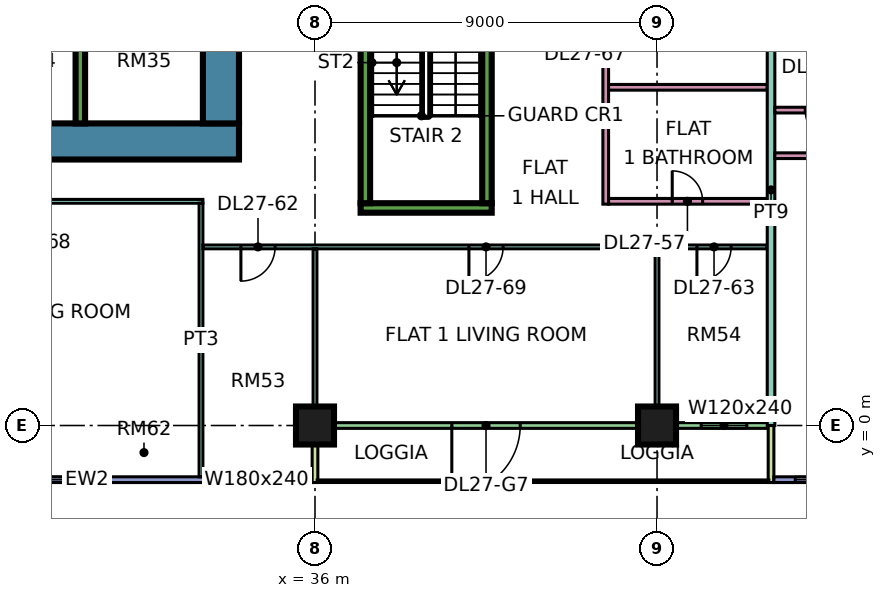
"""IFC4 building model, lengths in metres.
Left out: names, types, materials, properties, quantities, classifications, styles, units other than length and angle.
Written with IfcOpenShell. Run it as: python <this file> out.ifc"""

import sys

from ifc_helpers import new_model, si_unit, direction, frame, frame_2d, origin, origin_2d, place, context, subcontext, project, spatial, rectangle, extrude, element, fill, save


model = new_model("IFC4")
c1 = context("Model", 3, precision=1e-05, world=origin(), true_north=direction((0.0, 1.0)))
c2 = subcontext(c1, "Body", "Model", "MODEL_VIEW")
j1 = project(units=[si_unit("LENGTHUNIT", "METRE"), si_unit("PLANEANGLEUNIT", "RADIAN")], contexts=[c1])
p1 = place(None, origin())
s1 = spatial("IfcSite", under=j1, at=p1, CompositionType="ELEMENT")
p2 = place(p1, origin())
s2 = spatial("IfcBuilding", under=s1, at=p2, CompositionType="ELEMENT")
p3 = place(p2, frame((0.0, 0.0, 118.15)))
s3 = spatial("IfcBuildingStorey", under=s2, at=p3, CompositionType="ELEMENT", Elevation=118.15)
for number, where, z_axis, x_axis in (
    (1, (36.0, 0.0, 0.0), (0.0, 0.0, 1.0), (1.0, 0.0, 0.0)),
    (2, (45.0, 0.0, 0.0), (0.0, 0.0, 1.0), (1.0, 0.0, 0.0)),
):
    element("IfcColumn", number, at=place(p3, frame(where, z_axis=z_axis, x_axis=x_axis)), inside=s3, PredefinedType="COLUMN", context=c2, shape_type="SweptSolid", body=[
        extrude(rectangle(XDim=1.0, YDim=1.0, at=origin_2d()), origin(), (0.0, 0.0, 1.0), 3.75),
    ])
p4 = place(p3, frame((9.0, 7.475, 0.0), z_axis=(0.0, 0.0, 1.0), x_axis=(1.0, 0.0, 0.0)))
e3 = element("IfcWall", 3, at=p4, inside=s3, PredefinedType="SHEAR", context=c2, shape_type="SweptSolid", body=[
    extrude(rectangle(XDim=25.0, YDim=0.95, at=frame_2d((12.5, 0.0))), origin(), (0.0, 0.0, 1.0), 3.75),
])
p5 = place(p3, frame((33.525, 7.95, 0.0), z_axis=(0.0, 0.0, 1.0), x_axis=(0.0, 1.0, 0.0)))
e4 = element("IfcWall", 4, at=p5, inside=s3, PredefinedType="SHEAR", context=c2, shape_type="SweptSolid", body=[
    extrude(rectangle(XDim=11.1, YDim=0.95, at=frame_2d((5.55, 0.0))), origin(), (0.0, 0.0, 1.0), 3.75),
])
p6 = place(p5, frame((5.25, 0.0, 0.0)))
e5 = element("IfcOpeningElement", 5, at=p6, cuts=e4, PredefinedType="OPENING", context=c2, shape_type="SweptSolid", body=[
    extrude(rectangle(XDim=1.8, YDim=2.4, at=frame_2d((0.9, 1.2))), frame((0.0, 0.485, 0.0), z_axis=(0.0, -1.0, 0.0), x_axis=(1.0, 0.0, 0.0)), (0.0, 0.0, 1.0), 0.97),
])
p7 = place(p3, frame((29.825, 7.95, 0.0), z_axis=(0.0, 0.0, 1.0), x_axis=(0.0, 1.0, 0.0)))
e6 = element("IfcWall", 6, at=p7, inside=s3, PredefinedType="SHEAR", context=c2, shape_type="SweptSolid", body=[
    extrude(rectangle(XDim=3.25, YDim=0.25, at=frame_2d((1.625, 0.0))), origin(), (0.0, 0.0, 1.0), 3.75),
])
p8 = place(p3, frame((37.2, 5.725, 0.0), z_axis=(0.0, 0.0, 1.0), x_axis=(1.0, 0.0, 0.0)))
e7 = element("IfcWall", 7, at=p8, inside=s3, PredefinedType="SHEAR", context=c2, shape_type="SweptSolid", body=[
    extrude(rectangle(XDim=3.45, YDim=0.25, at=frame_2d((1.725, 0.0))), origin(), (0.0, 0.0, 1.0), 3.75),
])
for number, where, z_axis, x_axis in (
    (8, (37.325, 5.85, 0.0), (0.0, 0.0, 1.0), (0.0, 1.0, 0.0)),
    (9, (40.525, 5.85, 0.0), (0.0, 0.0, 1.0), (0.0, 1.0, 0.0)),
):
    element("IfcWall", number, at=place(p3, frame(where, z_axis=z_axis, x_axis=x_axis)), inside=s3, PredefinedType="SHEAR", context=c2, shape_type="SweptSolid", body=[
        extrude(rectangle(XDim=6.5, YDim=0.25, at=frame_2d((3.25, 0.0))), origin(), (0.0, 0.0, 1.0), 3.75),
    ])
p9 = place(p3, frame((24.075, -1.425, 0.0), z_axis=(0.0, 0.0, 1.0), x_axis=(1.0, 0.0, 0.0)))
e10 = element("IfcWall", 10, at=p9, inside=s3, PredefinedType="SOLIDWALL", context=c2, shape_type="SweptSolid", body=[
    extrude(rectangle(XDim=11.85, YDim=0.15, at=frame_2d((5.925, 0.0))), origin(), (0.0, 0.0, 1.0), 3.35),
])
p10 = place(p9, frame((2.962, 0.0, 0.45)))
e11 = element("IfcOpeningElement", 11, at=p10, cuts=e10, PredefinedType="OPENING", context=c2, shape_type="SweptSolid", body=[
    extrude(rectangle(XDim=3.0, YDim=2.4, at=frame_2d((1.5, 1.2))), frame((0.0, 0.085, 0.0), z_axis=(0.0, -1.0, 0.0), x_axis=(1.0, 0.0, 0.0)), (0.0, 0.0, 1.0), 0.17),
])
p11 = place(p9, frame((9.488, 0.0, 0.45)))
e12 = element("IfcOpeningElement", 12, at=p11, cuts=e10, PredefinedType="OPENING", context=c2, shape_type="SweptSolid", body=[
    extrude(rectangle(XDim=1.8, YDim=2.4, at=frame_2d((0.9, 1.2))), frame((0.0, 0.085, 0.0), z_axis=(0.0, -1.0, 0.0), x_axis=(1.0, 0.0, 0.0)), (0.0, 0.0, 1.0), 0.17),
])
p12 = place(p3, frame((36.075, 0.0, 0.0), z_axis=(0.0, 0.0, 1.0), x_axis=(1.0, 0.0, 0.0)))
e13 = element("IfcWall", 13, at=p12, inside=s3, PredefinedType="SOLIDWALL", context=c2, shape_type="SweptSolid", body=[
    extrude(rectangle(XDim=11.85, YDim=0.15, at=frame_2d((5.925, 0.0))), origin(), (0.0, 0.0, 1.0), 3.35),
])
p13 = place(p12, frame((3.525, 0.0, 0.0)))
e14 = element("IfcOpeningElement", 14, at=p13, cuts=e13, PredefinedType="OPENING", context=c2, shape_type="SweptSolid", body=[
    extrude(rectangle(XDim=1.8, YDim=2.4, at=frame_2d((0.9, 1.2))), frame((0.0, 0.085, 0.0), z_axis=(0.0, -1.0, 0.0), x_axis=(1.0, 0.0, 0.0)), (0.0, 0.0, 1.0), 0.17),
])
p14 = place(p12, frame((10.087, 0.0, 0.45)))
e15 = element("IfcOpeningElement", 15, at=p14, cuts=e13, PredefinedType="OPENING", context=c2, shape_type="SweptSolid", body=[
    extrude(rectangle(XDim=1.2, YDim=2.4, at=frame_2d((0.6, 1.2))), frame((0.0, 0.085, 0.0), z_axis=(0.0, -1.0, 0.0), x_axis=(1.0, 0.0, 0.0)), (0.0, 0.0, 1.0), 0.17),
])
for number, where, z_axis, x_axis in (
    (16, (36.0, -1.5, 0.0), (0.0, 0.0, 1.0), (0.0, 1.0, 0.0)),
    (17, (48.0, -1.5, 0.0), (0.0, 0.0, 1.0), (0.0, 1.0, 0.0)),
):
    element("IfcWall", number, at=place(p3, frame(where, z_axis=z_axis, x_axis=x_axis)), inside=s3, PredefinedType="SOLIDWALL", context=c2, shape_type="SweptSolid", body=[
        extrude(rectangle(XDim=1.5, YDim=0.15, at=frame_2d((0.75, 0.0))), origin(), (0.0, 0.0, 1.0), 3.35),
    ])
p15 = place(p3, frame((48.075, -1.425, 0.0), z_axis=(0.0, 0.0, 1.0), x_axis=(1.0, 0.0, 0.0)))
e18 = element("IfcWall", 18, at=p15, inside=s3, PredefinedType="SOLIDWALL", context=c2, shape_type="SweptSolid", body=[
    extrude(rectangle(XDim=11.85, YDim=0.15, at=frame_2d((5.925, 0.0))), origin(), (0.0, 0.0, 1.0), 3.35),
])
p16 = place(p15, frame((0.562, 0.0, 0.45)))
e19 = element("IfcOpeningElement", 19, at=p16, cuts=e18, PredefinedType="OPENING", context=c2, shape_type="SweptSolid", body=[
    extrude(rectangle(XDim=1.8, YDim=2.4, at=frame_2d((0.9, 1.2))), frame((0.0, 0.085, 0.0), z_axis=(0.0, -1.0, 0.0), x_axis=(1.0, 0.0, 0.0)), (0.0, 0.0, 1.0), 0.17),
])
p17 = place(p15, frame((3.525, 0.0, 0.45)))
e20 = element("IfcOpeningElement", 20, at=p17, cuts=e18, PredefinedType="OPENING", context=c2, shape_type="SweptSolid", body=[
    extrude(rectangle(XDim=1.8, YDim=2.4, at=frame_2d((0.9, 1.2))), frame((0.0, 0.085, 0.0), z_axis=(0.0, -1.0, 0.0), x_axis=(1.0, 0.0, 0.0)), (0.0, 0.0, 1.0), 0.17),
])
p18 = place(p15, frame((7.387, 0.0, 0.45)))
e21 = element("IfcOpeningElement", 21, at=p18, cuts=e18, PredefinedType="OPENING", context=c2, shape_type="SweptSolid", body=[
    extrude(rectangle(XDim=3.0, YDim=2.4, at=frame_2d((1.5, 1.2))), frame((0.0, 0.085, 0.0), z_axis=(0.0, -1.0, 0.0), x_axis=(1.0, 0.0, 0.0)), (0.0, 0.0, 1.0), 0.17),
])
p19 = place(p3, frame((11.95, 5.9, 0.0), z_axis=(0.0, 0.0, 1.0), x_axis=(1.0, 0.0, 0.0)))
e22 = element("IfcWall", 22, at=p19, inside=s3, PredefinedType="PARTITIONING", context=c2, shape_type="SweptSolid", body=[
    extrude(rectangle(XDim=21.1, YDim=0.1, at=frame_2d((10.55, 0.0))), origin(), (0.0, 0.0, 1.0), 3.35),
])
p20 = place(p19, frame((1.1, 0.0, 0.0)))
e23 = element("IfcOpeningElement", 23, at=p20, cuts=e22, PredefinedType="OPENING", context=c2, shape_type="SweptSolid", body=[
    extrude(rectangle(XDim=0.9, YDim=2.1, at=frame_2d((0.45, 1.05))), frame((0.0, 0.06, 0.0), z_axis=(0.0, -1.0, 0.0), x_axis=(1.0, 0.0, 0.0)), (0.0, 0.0, 1.0), 0.12),
])
p21 = place(p19, frame((4.1, 0.0, 0.0)))
e24 = element("IfcOpeningElement", 24, at=p21, cuts=e22, PredefinedType="OPENING", context=c2, shape_type="SweptSolid", body=[
    extrude(rectangle(XDim=0.9, YDim=2.1, at=frame_2d((0.45, 1.05))), frame((0.0, 0.06, 0.0), z_axis=(0.0, -1.0, 0.0), x_axis=(1.0, 0.0, 0.0)), (0.0, 0.0, 1.0), 0.12),
])
p22 = place(p19, frame((7.1, 0.0, 0.0)))
e25 = element("IfcOpeningElement", 25, at=p22, cuts=e22, PredefinedType="OPENING", context=c2, shape_type="SweptSolid", body=[
    extrude(rectangle(XDim=0.9, YDim=2.1, at=frame_2d((0.45, 1.05))), frame((0.0, 0.06, 0.0), z_axis=(0.0, -1.0, 0.0), x_axis=(1.0, 0.0, 0.0)), (0.0, 0.0, 1.0), 0.12),
])
p23 = place(p19, frame((10.1, 0.0, 0.0)))
e26 = element("IfcOpeningElement", 26, at=p23, cuts=e22, PredefinedType="OPENING", context=c2, shape_type="SweptSolid", body=[
    extrude(rectangle(XDim=0.9, YDim=2.1, at=frame_2d((0.45, 1.05))), frame((0.0, 0.06, 0.0), z_axis=(0.0, -1.0, 0.0), x_axis=(1.0, 0.0, 0.0)), (0.0, 0.0, 1.0), 0.12),
])
p24 = place(p19, frame((16.1, 0.0, 0.0)))
e27 = element("IfcOpeningElement", 27, at=p24, cuts=e22, PredefinedType="OPENING", context=c2, shape_type="SweptSolid", body=[
    extrude(rectangle(XDim=0.9, YDim=2.1, at=frame_2d((0.45, 1.05))), frame((0.0, 0.06, 0.0), z_axis=(0.0, -1.0, 0.0), x_axis=(1.0, 0.0, 0.0)), (0.0, 0.0, 1.0), 0.12),
])
p25 = place(p3, frame((33.0, -1.35, 0.0), z_axis=(0.0, 0.0, 1.0), x_axis=(0.0, 1.0, 0.0)))
e28 = element("IfcWall", 28, at=p25, inside=s3, PredefinedType="PARTITIONING", context=c2, shape_type="SweptSolid", body=[
    extrude(rectangle(XDim=7.2, YDim=0.1, at=frame_2d((3.6, 0.0))), origin(), (0.0, 0.0, 1.0), 3.35),
])
p26 = place(p3, frame((33.05, 4.7, 0.0), z_axis=(0.0, 0.0, 1.0), x_axis=(1.0, 0.0, 0.0)))
e29 = element("IfcWall", 29, at=p26, inside=s3, PredefinedType="PARTITIONING", context=c2, shape_type="SweptSolid", body=[
    extrude(rectangle(XDim=14.85, YDim=0.1, at=frame_2d((7.425, 0.0))), origin(), (0.0, 0.0, 1.0), 3.35),
])
p27 = place(p26, frame((1.0, 0.0, 0.0)))
e30 = element("IfcOpeningElement", 30, at=p27, cuts=e29, PredefinedType="OPENING", context=c2, shape_type="SweptSolid", body=[
    extrude(rectangle(XDim=0.9, YDim=2.1, at=frame_2d((0.45, 1.05))), frame((0.0, 0.06, 0.0), z_axis=(0.0, -1.0, 0.0), x_axis=(1.0, 0.0, 0.0)), (0.0, 0.0, 1.0), 0.12),
])
p28 = place(p26, frame((13.0, 0.0, 0.0)))
e31 = element("IfcOpeningElement", 31, at=p28, cuts=e29, PredefinedType="OPENING", context=c2, shape_type="SweptSolid", body=[
    extrude(rectangle(XDim=0.9, YDim=2.1, at=frame_2d((0.45, 1.05))), frame((0.0, 0.06, 0.0), z_axis=(0.0, -1.0, 0.0), x_axis=(1.0, 0.0, 0.0)), (0.0, 0.0, 1.0), 0.12),
])
p29 = place(p26, frame((7.0, 0.0, 0.0)))
e32 = element("IfcOpeningElement", 32, at=p29, cuts=e29, PredefinedType="OPENING", context=c2, shape_type="SweptSolid", body=[
    extrude(rectangle(XDim=0.9, YDim=2.1, at=frame_2d((0.45, 1.05))), frame((0.0, 0.06, 0.0), z_axis=(0.0, -1.0, 0.0), x_axis=(1.0, 0.0, 0.0)), (0.0, 0.0, 1.0), 0.12),
])
p30 = place(p3, frame((36.0, 0.0, 0.0), z_axis=(0.0, 0.0, 1.0), x_axis=(0.0, 1.0, 0.0)))
e33 = element("IfcWall", 33, at=p30, inside=s3, PredefinedType="PARTITIONING", context=c2, shape_type="SweptSolid", body=[
    extrude(rectangle(XDim=4.65, YDim=0.1, at=frame_2d((2.325, 0.0))), origin(), (0.0, 0.0, 1.0), 3.35),
])
p31 = place(p3, frame((43.65, 5.825, 0.0), z_axis=(0.0, 0.0, 1.0), x_axis=(0.0, 1.0, 0.0)))
e34 = element("IfcWall", 34, at=p31, inside=s3, PredefinedType="PARTITIONING", context=c2, shape_type="SweptSolid", body=[
    extrude(rectangle(XDim=6.575, YDim=0.15, at=frame_2d((3.288, 0.0))), origin(), (0.0, 0.0, 1.0), 3.35),
])
p32 = place(p31, frame((4.425, 0.0, 0.0)))
e35 = element("IfcOpeningElement", 35, at=p32, cuts=e34, PredefinedType="OPENING", context=c2, shape_type="SweptSolid", body=[
    extrude(rectangle(XDim=0.9, YDim=2.1, at=frame_2d((0.45, 1.05))), frame((0.0, 0.085, 0.0), z_axis=(0.0, -1.0, 0.0), x_axis=(1.0, 0.0, 0.0)), (0.0, 0.0, 1.0), 0.17),
])
p33 = place(p3, frame((43.725, 5.9, 0.0), z_axis=(0.0, 0.0, 1.0), x_axis=(1.0, 0.0, 0.0)))
e36 = element("IfcWall", 36, at=p33, inside=s3, PredefinedType="PARTITIONING", context=c2, shape_type="SweptSolid", body=[
    extrude(rectangle(XDim=4.175, YDim=0.15, at=frame_2d((2.087, 0.0))), origin(), (0.0, 0.0, 1.0), 3.35),
])
p34 = place(p33, frame((1.675, 0.0, 0.0)))
e37 = element("IfcOpeningElement", 37, at=p34, cuts=e36, PredefinedType="OPENING", context=c2, shape_type="SweptSolid", body=[
    extrude(rectangle(XDim=0.8, YDim=2.1, at=frame_2d((0.4, 1.05))), frame((0.0, 0.085, 0.0), z_axis=(0.0, -1.0, 0.0), x_axis=(1.0, 0.0, 0.0)), (0.0, 0.0, 1.0), 0.17),
])
p35 = place(p3, frame((43.725, 8.9, 0.0), z_axis=(0.0, 0.0, 1.0), x_axis=(1.0, 0.0, 0.0)))
e38 = element("IfcWall", 38, at=p35, inside=s3, PredefinedType="PARTITIONING", context=c2, shape_type="SweptSolid", body=[
    extrude(rectangle(XDim=4.175, YDim=0.15, at=frame_2d((2.087, 0.0))), origin(), (0.0, 0.0, 1.0), 3.35),
])
p36 = place(p3, frame((45.0, 0.074, 0.0), z_axis=(0.0, 0.0, 1.0), x_axis=(0.0, 1.0, 0.0)))
e39 = element("IfcWall", 39, at=p36, inside=s3, PredefinedType="PARTITIONING", context=c2, shape_type="SweptSolid", body=[
    extrude(rectangle(XDim=4.576, YDim=0.1, at=frame_2d((2.288, 0.0))), origin(), (0.0, 0.0, 1.0), 3.35),
])
p37 = place(p3, frame((48.0, 0.0, 0.0), z_axis=(0.0, 0.0, 1.0), x_axis=(0.0, 1.0, 0.0)))
e40 = element("IfcWall", 40, at=p37, inside=s3, PredefinedType="PARTITIONING", context=c2, shape_type="SweptSolid", body=[
    extrude(rectangle(XDim=12.4, YDim=0.2, at=frame_2d((6.2, 0.0))), origin(), (0.0, 0.0, 1.0), 3.35),
])
p38 = place(p3, frame((48.1, 7.1, 0.0), z_axis=(0.0, 0.0, 1.0), x_axis=(1.0, 0.0, 0.0)))
e41 = element("IfcWall", 41, at=p38, inside=s3, PredefinedType="PARTITIONING", context=c2, shape_type="SweptSolid", body=[
    extrude(rectangle(XDim=25.25, YDim=0.15, at=frame_2d((12.625, 0.0))), origin(), (0.0, 0.0, 1.0), 3.35),
])
p39 = place(p38, frame((0.95, 0.0, 0.0)))
e42 = element("IfcOpeningElement", 42, at=p39, cuts=e41, PredefinedType="OPENING", context=c2, shape_type="SweptSolid", body=[
    extrude(rectangle(XDim=0.9, YDim=2.1, at=frame_2d((0.45, 1.05))), frame((0.0, 0.085, 0.0), z_axis=(0.0, -1.0, 0.0), x_axis=(1.0, 0.0, 0.0)), (0.0, 0.0, 1.0), 0.17),
])
p40 = place(p38, frame((21.95, 0.0, 0.0)))
e43 = element("IfcOpeningElement", 43, at=p40, cuts=e41, PredefinedType="OPENING", context=c2, shape_type="SweptSolid", body=[
    extrude(rectangle(XDim=0.9, YDim=2.1, at=frame_2d((0.45, 1.05))), frame((0.0, 0.085, 0.0), z_axis=(0.0, -1.0, 0.0), x_axis=(1.0, 0.0, 0.0)), (0.0, 0.0, 1.0), 0.17),
])
p41 = place(p38, frame((9.95, 0.0, 0.0)))
e44 = element("IfcOpeningElement", 44, at=p41, cuts=e41, PredefinedType="OPENING", context=c2, shape_type="SweptSolid", body=[
    extrude(rectangle(XDim=0.9, YDim=2.1, at=frame_2d((0.45, 1.05))), frame((0.0, 0.085, 0.0), z_axis=(0.0, -1.0, 0.0), x_axis=(1.0, 0.0, 0.0)), (0.0, 0.0, 1.0), 0.17),
])
p42 = place(p38, frame((14.45, 0.0, 0.0)))
e45 = element("IfcOpeningElement", 45, at=p42, cuts=e41, PredefinedType="OPENING", context=c2, shape_type="SweptSolid", body=[
    extrude(rectangle(XDim=0.9, YDim=2.1, at=frame_2d((0.45, 1.05))), frame((0.0, 0.085, 0.0), z_axis=(0.0, -1.0, 0.0), x_axis=(1.0, 0.0, 0.0)), (0.0, 0.0, 1.0), 0.17),
])
p43 = place(p38, frame((19.8, 0.0, 0.0)))
e46 = element("IfcOpeningElement", 46, at=p43, cuts=e41, PredefinedType="OPENING", context=c2, shape_type="SweptSolid", body=[
    extrude(rectangle(XDim=0.8, YDim=2.1, at=frame_2d((0.4, 1.05))), frame((0.0, 0.085, 0.0), z_axis=(0.0, -1.0, 0.0), x_axis=(1.0, 0.0, 0.0)), (0.0, 0.0, 1.0), 0.17),
])
p44 = place(p38, frame((3.95, 0.0, 0.0)))
e47 = element("IfcOpeningElement", 47, at=p44, cuts=e41, PredefinedType="OPENING", context=c2, shape_type="SweptSolid", body=[
    extrude(rectangle(XDim=0.9, YDim=2.1, at=frame_2d((0.45, 1.05))), frame((0.0, 0.085, 0.0), z_axis=(0.0, -1.0, 0.0), x_axis=(1.0, 0.0, 0.0)), (0.0, 0.0, 1.0), 0.17),
])
p45 = place(p3, frame((48.1, 8.3, 0.0), z_axis=(0.0, 0.0, 1.0), x_axis=(1.0, 0.0, 0.0)))
e48 = element("IfcWall", 48, at=p45, inside=s3, PredefinedType="PARTITIONING", context=c2, shape_type="SweptSolid", body=[
    extrude(rectangle(XDim=12.575, YDim=0.15, at=frame_2d((6.288, 0.0))), origin(), (0.0, 0.0, 1.0), 3.35),
])
p46 = place(p45, frame((3.75, 0.0, 0.0)))
e49 = element("IfcOpeningElement", 49, at=p46, cuts=e48, PredefinedType="OPENING", context=c2, shape_type="SweptSolid", body=[
    extrude(rectangle(XDim=0.8, YDim=2.1, at=frame_2d((0.4, 1.05))), frame((0.0, 0.085, 0.0), z_axis=(0.0, -1.0, 0.0), x_axis=(1.0, 0.0, 0.0)), (0.0, 0.0, 1.0), 0.17),
])
p47 = place(p45, frame((0.8, 0.0, 0.0)))
e50 = element("IfcOpeningElement", 50, at=p47, cuts=e48, PredefinedType="OPENING", context=c2, shape_type="SweptSolid", body=[
    extrude(rectangle(XDim=0.9, YDim=2.1, at=frame_2d((0.45, 1.05))), frame((0.0, 0.085, 0.0), z_axis=(0.0, -1.0, 0.0), x_axis=(1.0, 0.0, 0.0)), (0.0, 0.0, 1.0), 0.17),
])
p48 = place(p45, frame((6.75, 0.0, 0.0)))
e51 = element("IfcOpeningElement", 51, at=p48, cuts=e48, PredefinedType="OPENING", context=c2, shape_type="SweptSolid", body=[
    extrude(rectangle(XDim=0.8, YDim=2.1, at=frame_2d((0.4, 1.05))), frame((0.0, 0.085, 0.0), z_axis=(0.0, -1.0, 0.0), x_axis=(1.0, 0.0, 0.0)), (0.0, 0.0, 1.0), 0.17),
])
p49 = place(p45, frame((10.2, 0.0, 0.0)))
e52 = element("IfcOpeningElement", 52, at=p49, cuts=e48, PredefinedType="OPENING", context=c2, shape_type="SweptSolid", body=[
    extrude(rectangle(XDim=0.8, YDim=2.1, at=frame_2d((0.4, 1.05))), frame((0.0, 0.085, 0.0), z_axis=(0.0, -1.0, 0.0), x_axis=(1.0, 0.0, 0.0)), (0.0, 0.0, 1.0), 0.17),
])
p50 = place(p10, origin())
e53 = element("IfcWindow", 53, at=p50, inside=s3, PartitioningType="SINGLE_PANEL", PredefinedType="WINDOW", context=c2, shape_type="SweptSolid", body=[
    extrude(rectangle(XDim=3.0, YDim=2.4, at=frame_2d((1.5, 1.2))), frame((0.0, 0.03, 0.0), z_axis=(0.0, -1.0, 0.0), x_axis=(1.0, 0.0, 0.0)), (0.0, 0.0, 1.0), 0.06),
])
fill(e11, e53)
p51 = place(p11, origin())
e54 = element("IfcWindow", 54, at=p51, inside=s3, PartitioningType="SINGLE_PANEL", PredefinedType="WINDOW", context=c2, shape_type="SweptSolid", body=[
    extrude(rectangle(XDim=1.8, YDim=2.4, at=frame_2d((0.9, 1.2))), frame((0.0, 0.03, 0.0), z_axis=(0.0, -1.0, 0.0), x_axis=(1.0, 0.0, 0.0)), (0.0, 0.0, 1.0), 0.06),
])
fill(e12, e54)
p52 = place(p13, frame((1.8, 0.0, 0.0), z_axis=(0.0, 0.0, 1.0), x_axis=(-1.0, 0.0, 0.0)))
e55 = element("IfcDoor", 55, at=p52, inside=s3, OperationType="DOUBLE_DOOR_SINGLE_SWING", PredefinedType="DOOR", context=c2, shape_type="SweptSolid", body=[
    extrude(rectangle(XDim=1.8, YDim=2.4, at=frame_2d((0.9, 1.2))), frame((0.0, 0.025, 0.0), z_axis=(0.0, -1.0, 0.0), x_axis=(1.0, 0.0, 0.0)), (0.0, 0.0, 1.0), 0.05),
])
fill(e14, e55)
p53 = place(p14, origin())
e56 = element("IfcWindow", 56, at=p53, inside=s3, PartitioningType="SINGLE_PANEL", PredefinedType="WINDOW", context=c2, shape_type="SweptSolid", body=[
    extrude(rectangle(XDim=1.2, YDim=2.4, at=frame_2d((0.6, 1.2))), frame((0.0, 0.03, 0.0), z_axis=(0.0, -1.0, 0.0), x_axis=(1.0, 0.0, 0.0)), (0.0, 0.0, 1.0), 0.06),
])
fill(e15, e56)
p54 = place(p16, origin())
e57 = element("IfcWindow", 57, at=p54, inside=s3, PartitioningType="SINGLE_PANEL", PredefinedType="WINDOW", context=c2, shape_type="SweptSolid", body=[
    extrude(rectangle(XDim=1.8, YDim=2.4, at=frame_2d((0.9, 1.2))), frame((0.0, 0.03, 0.0), z_axis=(0.0, -1.0, 0.0), x_axis=(1.0, 0.0, 0.0)), (0.0, 0.0, 1.0), 0.06),
])
fill(e19, e57)
p55 = place(p47, origin())
e58 = element("IfcDoor", 58, at=p55, inside=s3, OperationType="SINGLE_SWING_RIGHT", PredefinedType="DOOR", context=c2, shape_type="SweptSolid", body=[
    extrude(rectangle(XDim=0.9, YDim=2.1, at=frame_2d((0.45, 1.05))), frame((0.0, 0.025, 0.0), z_axis=(0.0, -1.0, 0.0), x_axis=(1.0, 0.0, 0.0)), (0.0, 0.0, 1.0), 0.05),
])
fill(e50, e58)
p56 = place(p34, origin())
e59 = element("IfcDoor", 59, at=p56, inside=s3, OperationType="SINGLE_SWING_LEFT", PredefinedType="DOOR", context=c2, shape_type="SweptSolid", body=[
    extrude(rectangle(XDim=0.8, YDim=2.1, at=frame_2d((0.4, 1.05))), frame((0.0, 0.025, 0.0), z_axis=(0.0, -1.0, 0.0), x_axis=(1.0, 0.0, 0.0)), (0.0, 0.0, 1.0), 0.05),
])
fill(e37, e59)
p57 = place(p27, frame((0.9, 0.0, 0.0), z_axis=(0.0, 0.0, 1.0), x_axis=(-1.0, 0.0, 0.0)))
e60 = element("IfcDoor", 60, at=p57, inside=s3, OperationType="SINGLE_SWING_LEFT", PredefinedType="DOOR", context=c2, shape_type="SweptSolid", body=[
    extrude(rectangle(XDim=0.9, YDim=2.1, at=frame_2d((0.45, 1.05))), frame((0.0, 0.025, 0.0), z_axis=(0.0, -1.0, 0.0), x_axis=(1.0, 0.0, 0.0)), (0.0, 0.0, 1.0), 0.05),
])
fill(e30, e60)
p58 = place(p28, frame((0.9, 0.0, 0.0), z_axis=(0.0, 0.0, 1.0), x_axis=(-1.0, 0.0, 0.0)))
e61 = element("IfcDoor", 61, at=p58, inside=s3, OperationType="SINGLE_SWING_LEFT", PredefinedType="DOOR", context=c2, shape_type="SweptSolid", body=[
    extrude(rectangle(XDim=0.9, YDim=2.1, at=frame_2d((0.45, 1.05))), frame((0.0, 0.025, 0.0), z_axis=(0.0, -1.0, 0.0), x_axis=(1.0, 0.0, 0.0)), (0.0, 0.0, 1.0), 0.05),
])
fill(e31, e61)
p59 = place(p29, frame((0.9, 0.0, 0.0), z_axis=(0.0, 0.0, 1.0), x_axis=(-1.0, 0.0, 0.0)))
e62 = element("IfcDoor", 62, at=p59, inside=s3, OperationType="SINGLE_SWING_LEFT", PredefinedType="DOOR", context=c2, shape_type="SweptSolid", body=[
    extrude(rectangle(XDim=0.9, YDim=2.1, at=frame_2d((0.45, 1.05))), frame((0.0, 0.025, 0.0), z_axis=(0.0, -1.0, 0.0), x_axis=(1.0, 0.0, 0.0)), (0.0, 0.0, 1.0), 0.05),
])
fill(e32, e62)
save(model, sys.argv[1])
